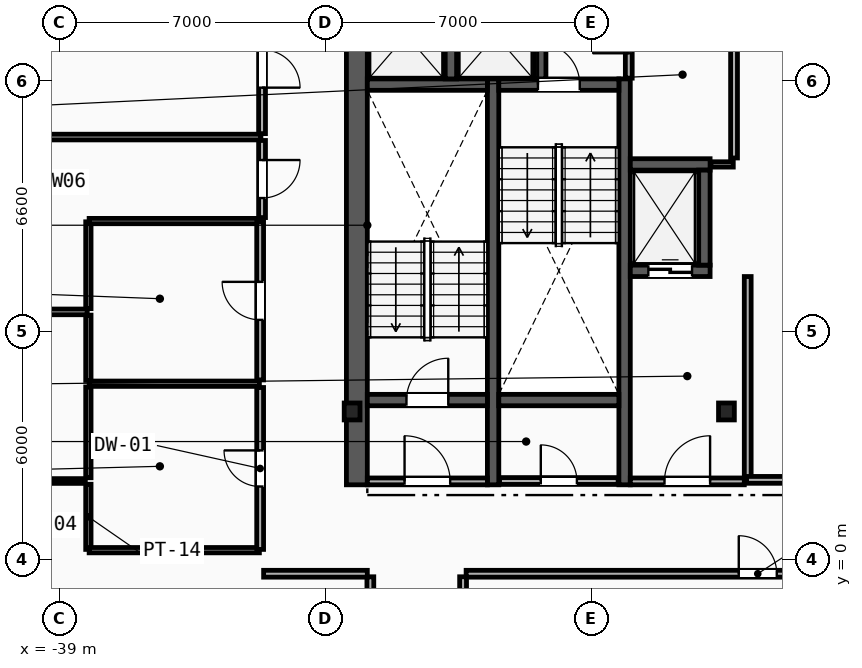
"""IFC4 building model, lengths in metres.
Left out: names, types, materials, properties, quantities, classifications, styles, units other than length and angle.
Written with IfcOpenShell. Run it as: python <this file> out.ifc"""

import sys

from ifc_helpers import new_model, si_unit, direction, frame, frame_2d, origin, origin_2d, place, context, subcontext, project, spatial, rectangle, i_section, extrude, element, fill, save


model = new_model("IFC4")
c1 = context("Model", 3, precision=1e-05, world=origin(), true_north=direction((0.0, 1.0)))
c2 = subcontext(c1, "Body", "Model", "MODEL_VIEW")
j1 = project(units=[si_unit("LENGTHUNIT", "METRE"), si_unit("PLANEANGLEUNIT", "RADIAN")], contexts=[c1])
p1 = place(None, origin())
s1 = spatial("IfcSite", under=j1, at=p1, CompositionType="ELEMENT")
p2 = place(p1, origin())
s2 = spatial("IfcBuilding", under=s1, at=p2, CompositionType="ELEMENT")
p3 = place(p2, frame((0.0, 0.0, 254.0)))
s3 = spatial("IfcBuildingStorey", under=s2, at=p3, CompositionType="ELEMENT", Elevation=254.0)
for number, where, z_axis, x_axis in (
    (1, (-31.3, 3.9, 0.0), (0.0, 0.0, 1.0), (1.0, 0.0, 0.0)),
    (2, (-21.45, 3.9, 0.0), (0.0, 0.0, 1.0), (1.0, 0.0, 0.0)),
):
    element("IfcColumn", number, at=place(p3, frame(where, z_axis=z_axis, x_axis=x_axis)), inside=s3, PredefinedType="COLUMN", context=c2, shape_type="SweptSolid", body=[
        extrude(i_section(OverallWidth=0.416, OverallDepth=0.446, WebThickness=0.039, FlangeThickness=0.063, FilletRadius=0.018, at=origin_2d()), origin(), (0.0, 0.0, 1.0), 3.6),
    ])
p4 = place(p3, frame((-31.175, 1.97, 0.0), z_axis=(0.0, 0.0, 1.0), x_axis=(0.0, 1.0, 0.0)))
e3 = element("IfcWall", 3, at=p4, inside=s3, PredefinedType="SHEAR", context=c2, shape_type="SweptSolid", body=[
    extrude(rectangle(XDim=13.33, YDim=0.55, at=frame_2d((6.665, 0.0))), origin(), (0.0, 0.0, 1.0), 3.34),
])
for number, where, z_axis, x_axis in (
    (4, (-27.59, 1.97, 0.0), (0.0, 0.0, 1.0), (0.0, 1.0, 0.0)),
    (5, (-24.13, 1.97, 0.0), (0.0, 0.0, 1.0), (0.0, 1.0, 0.0)),
):
    element("IfcWall", number, at=place(p3, frame(where, z_axis=z_axis, x_axis=x_axis)), inside=s3, PredefinedType="SHEAR", context=c2, shape_type="SweptSolid", body=[
        extrude(rectangle(XDim=10.68, YDim=0.3, at=frame_2d((5.34, 0.0))), origin(), (0.0, 0.0, 1.0), 3.34),
    ])
p5 = place(p3, frame((-30.9, 4.2, 0.0), z_axis=(0.0, 0.0, 1.0), x_axis=(1.0, 0.0, 0.0)))
e6 = element("IfcWall", 6, at=p5, inside=s3, PredefinedType="SHEAR", context=c2, shape_type="SweptSolid", body=[
    extrude(rectangle(XDim=3.16, YDim=0.3, at=frame_2d((1.58, 0.0))), origin(), (0.0, 0.0, 1.0), 3.34),
])
p6 = place(p5, frame((1.03, 0.0, 0.0)))
e7 = element("IfcOpeningElement", 7, at=p6, cuts=e6, PredefinedType="OPENING", context=c2, shape_type="SweptSolid", body=[
    extrude(rectangle(XDim=1.1, YDim=2.15, at=frame_2d((0.55, 1.075))), frame((0.0, 0.16, 0.0), z_axis=(0.0, -1.0, 0.0), x_axis=(1.0, 0.0, 0.0)), (0.0, 0.0, 1.0), 0.32),
])
p7 = place(p3, frame((-30.9, 12.5, 0.0), z_axis=(0.0, 0.0, 1.0), x_axis=(1.0, 0.0, 0.0)))
e8 = element("IfcWall", 8, at=p7, inside=s3, PredefinedType="SHEAR", context=c2, shape_type="SweptSolid", body=[
    extrude(rectangle(XDim=3.16, YDim=0.3, at=frame_2d((1.58, 0.0))), origin(), (0.0, 0.0, 1.0), 3.34),
])
p8 = place(p3, frame((-27.44, 12.5, 0.0), z_axis=(0.0, 0.0, 1.0), x_axis=(1.0, 0.0, 0.0)))
e9 = element("IfcWall", 9, at=p8, inside=s3, PredefinedType="SHEAR", context=c2, shape_type="SweptSolid", body=[
    extrude(rectangle(XDim=3.16, YDim=0.3, at=frame_2d((1.58, 0.0))), origin(), (0.0, 0.0, 1.0), 3.34),
])
p9 = place(p8, frame((1.03, 0.0, 0.0)))
e10 = element("IfcOpeningElement", 10, at=p9, cuts=e9, PredefinedType="OPENING", context=c2, shape_type="SweptSolid", body=[
    extrude(rectangle(XDim=1.1, YDim=2.15, at=frame_2d((0.55, 1.075))), frame((0.0, 0.16, 0.0), z_axis=(0.0, -1.0, 0.0), x_axis=(1.0, 0.0, 0.0)), (0.0, 0.0, 1.0), 0.32),
])
p10 = place(p3, frame((-27.44, 4.2, 0.0), z_axis=(0.0, 0.0, 1.0), x_axis=(1.0, 0.0, 0.0)))
e11 = element("IfcWall", 11, at=p10, inside=s3, PredefinedType="SHEAR", context=c2, shape_type="SweptSolid", body=[
    extrude(rectangle(XDim=3.16, YDim=0.3, at=frame_2d((1.58, 0.0))), origin(), (0.0, 0.0, 1.0), 3.34),
])
p11 = place(p3, frame((-20.89, 2.15, 0.0), z_axis=(0.0, 0.0, 1.0), x_axis=(0.0, 1.0, 0.0)))
e12 = element("IfcWall", 12, at=p11, inside=s3, PredefinedType="PARTITIONING", context=c2, shape_type="SweptSolid", body=[
    extrude(rectangle(XDim=5.3, YDim=0.18, at=frame_2d((2.65, 0.0))), origin(), (0.0, 0.0, 1.0), 3.34),
])
p12 = place(p3, frame((-23.98, 2.06, 0.0), z_axis=(0.0, 0.0, 1.0), x_axis=(1.0, 0.0, 0.0)))
e13 = element("IfcWall", 13, at=p12, inside=s3, PredefinedType="PARTITIONING", context=c2, shape_type="SweptSolid", body=[
    extrude(rectangle(XDim=3.0, YDim=0.18, at=frame_2d((1.5, 0.0))), origin(), (0.0, 0.0, 1.0), 3.34),
])
p13 = place(p12, frame((0.9, 0.0, 0.0)))
e14 = element("IfcOpeningElement", 14, at=p13, cuts=e13, PredefinedType="OPENING", context=c2, shape_type="SweptSolid", body=[
    extrude(rectangle(XDim=1.2, YDim=2.15, at=frame_2d((0.6, 1.075))), frame((0.0, 0.1, 0.0), z_axis=(0.0, -1.0, 0.0), x_axis=(1.0, 0.0, 0.0)), (0.0, 0.0, 1.0), 0.2),
])
p14 = place(p3, frame((-30.9, 2.06, 0.0), z_axis=(0.0, 0.0, 1.0), x_axis=(1.0, 0.0, 0.0)))
e15 = element("IfcWall", 15, at=p14, inside=s3, PredefinedType="PARTITIONING", context=c2, shape_type="SweptSolid", body=[
    extrude(rectangle(XDim=3.16, YDim=0.18, at=frame_2d((1.58, 0.0))), origin(), (0.0, 0.0, 1.0), 3.34),
])
p15 = place(p14, frame((0.98, 0.0, 0.0)))
e16 = element("IfcOpeningElement", 16, at=p15, cuts=e15, PredefinedType="OPENING", context=c2, shape_type="SweptSolid", body=[
    extrude(rectangle(XDim=1.2, YDim=2.15, at=frame_2d((0.6, 1.075))), frame((0.0, 0.1, 0.0), z_axis=(0.0, -1.0, 0.0), x_axis=(1.0, 0.0, 0.0)), (0.0, 0.0, 1.0), 0.2),
])
p16 = place(p3, frame((-23.98, 7.6, 0.0), z_axis=(0.0, 0.0, 1.0), x_axis=(1.0, 0.0, 0.0)))
e17 = element("IfcWall", 17, at=p16, inside=s3, PredefinedType="SHEAR", context=c2, shape_type="SweptSolid", body=[
    extrude(rectangle(XDim=2.1, YDim=0.3, at=frame_2d((1.05, 0.0))), origin(), (0.0, 0.0, 1.0), 3.34),
])
p17 = place(p16, frame((0.475, 0.0, 0.0)))
e18 = element("IfcOpeningElement", 18, at=p17, cuts=e17, PredefinedType="OPENING", context=c2, shape_type="SweptSolid", body=[
    extrude(rectangle(XDim=1.15, YDim=2.2, at=frame_2d((0.575, 1.1))), frame((0.0, 0.16, 0.0), z_axis=(0.0, -1.0, 0.0), x_axis=(1.0, 0.0, 0.0)), (0.0, 0.0, 1.0), 0.32),
])
p18 = place(p3, frame((-23.98, 10.4, 0.0), z_axis=(0.0, 0.0, 1.0), x_axis=(1.0, 0.0, 0.0)))
e19 = element("IfcWall", 19, at=p18, inside=s3, PredefinedType="SHEAR", context=c2, shape_type="SweptSolid", body=[
    extrude(rectangle(XDim=2.1, YDim=0.3, at=frame_2d((1.05, 0.0))), origin(), (0.0, 0.0, 1.0), 3.34),
])
p19 = place(p3, frame((-22.03, 7.75, 0.0), z_axis=(0.0, 0.0, 1.0), x_axis=(0.0, 1.0, 0.0)))
e20 = element("IfcWall", 20, at=p19, inside=s3, PredefinedType="SHEAR", context=c2, shape_type="SweptSolid", body=[
    extrude(rectangle(XDim=2.5, YDim=0.3, at=frame_2d((1.25, 0.0))), origin(), (0.0, 0.0, 1.0), 3.34),
])
for number, where, z_axis, x_axis in (
    (21, (-28.7, 12.65, 0.0), (0.0, 0.0, 1.0), (0.0, 1.0, 0.0)),
    (22, (-26.35, 12.65, 0.0), (0.0, 0.0, 1.0), (0.0, 1.0, 0.0)),
):
    element("IfcWall", number, at=place(p3, frame(where, z_axis=z_axis, x_axis=x_axis)), inside=s3, PredefinedType="SHEAR", context=c2, shape_type="SweptSolid", body=[
        extrude(rectangle(XDim=2.3, YDim=0.3, at=frame_2d((1.15, 0.0))), origin(), (0.0, 0.0, 1.0), 3.34),
    ])
p20 = place(p3, frame((-21.86, 10.4, 0.0), z_axis=(0.0, 0.0, 1.0), x_axis=(1.0, 0.0, 0.0)))
e23 = element("IfcWall", 23, at=p20, inside=s3, PredefinedType="PARTITIONING", context=c2, shape_type="SweptSolid", body=[
    extrude(rectangle(XDim=0.59, YDim=0.14, at=frame_2d((0.295, 0.0))), origin(), (0.0, 0.0, 1.0), 3.34),
])
p21 = place(p3, frame((-21.25, 10.57, 0.0), z_axis=(0.0, 0.0, 1.0), x_axis=(0.0, 1.0, 0.0)))
e24 = element("IfcWall", 24, at=p21, inside=s3, PredefinedType="PARTITIONING", context=c2, shape_type="SweptSolid", body=[
    extrude(rectangle(XDim=4.36, YDim=0.18, at=frame_2d((2.18, 0.0))), origin(), (0.0, 0.0, 1.0), 3.34),
])
p22 = place(p3, frame((-27.42, 2.07, 0.0), z_axis=(0.0, 0.0, 1.0), x_axis=(1.0, 0.0, 0.0)))
e25 = element("IfcWall", 25, at=p22, inside=s3, PredefinedType="PARTITIONING", context=c2, shape_type="SweptSolid", body=[
    extrude(rectangle(XDim=3.12, YDim=0.18, at=frame_2d((1.56, 0.0))), origin(), (0.0, 0.0, 1.0), 3.34),
])
p23 = place(p22, frame((1.085, 0.0, 0.0)))
e26 = element("IfcOpeningElement", 26, at=p23, cuts=e25, PredefinedType="OPENING", context=c2, shape_type="SweptSolid", body=[
    extrude(rectangle(XDim=0.95, YDim=2.1, at=frame_2d((0.475, 1.05))), frame((0.0, 0.1, 0.0), z_axis=(0.0, -1.0, 0.0), x_axis=(1.0, 0.0, 0.0)), (0.0, 0.0, 1.0), 0.2),
])
p24 = place(p3, frame((-24.02, 12.67, 0.0), z_axis=(0.0, 0.0, 1.0), x_axis=(0.0, 1.0, 0.0)))
e27 = element("IfcWall", 27, at=p24, inside=s3, PredefinedType="PARTITIONING", context=c2, shape_type="SweptSolid", body=[
    extrude(rectangle(XDim=2.26, YDim=0.18, at=frame_2d((1.13, 0.0))), origin(), (0.0, 0.0, 1.0), 3.34),
])
p25 = place(p24, frame((0.655, 0.0, 0.0)))
e28 = element("IfcOpeningElement", 28, at=p25, cuts=e27, PredefinedType="OPENING", context=c2, shape_type="SweptSolid", body=[
    extrude(rectangle(XDim=0.95, YDim=2.1, at=frame_2d((0.475, 1.05))), frame((0.0, 0.1, 0.0), z_axis=(0.0, -1.0, 0.0), x_axis=(1.0, 0.0, 0.0)), (0.0, 0.0, 1.0), 0.2),
])
p26 = place(p3, frame((-38.24, 0.27, 0.0), z_axis=(0.0, 0.0, 1.0), x_axis=(0.0, 1.0, 0.0)))
e29 = element("IfcWall", 29, at=p26, inside=s3, PredefinedType="PARTITIONING", context=c2, shape_type="SweptSolid", body=[
    extrude(rectangle(XDim=1.715, YDim=0.14, at=frame_2d((0.857, 0.0))), origin(), (0.0, 0.0, 1.0), 3.34),
])
p27 = place(p3, frame((-38.24, 2.155, 0.0), z_axis=(0.0, 0.0, 1.0), x_axis=(0.0, 1.0, 0.0)))
e30 = element("IfcWall", 30, at=p27, inside=s3, PredefinedType="PARTITIONING", context=c2, shape_type="SweptSolid", body=[
    extrude(rectangle(XDim=2.39, YDim=0.14, at=frame_2d((1.195, 0.0))), origin(), (0.0, 0.0, 1.0), 3.34),
])
p28 = place(p3, frame((-38.24, 4.715, 0.0), z_axis=(0.0, 0.0, 1.0), x_axis=(0.0, 1.0, 0.0)))
e31 = element("IfcWall", 31, at=p28, inside=s3, PredefinedType="PARTITIONING", context=c2, shape_type="SweptSolid", body=[
    extrude(rectangle(XDim=1.72, YDim=0.14, at=frame_2d((0.86, 0.0))), origin(), (0.0, 0.0, 1.0), 3.34),
])
p29 = place(p3, frame((-38.24, 6.605, 0.0), z_axis=(0.0, 0.0, 1.0), x_axis=(0.0, 1.0, 0.0)))
e32 = element("IfcWall", 32, at=p29, inside=s3, PredefinedType="PARTITIONING", context=c2, shape_type="SweptSolid", body=[
    extrude(rectangle(XDim=2.285, YDim=0.14, at=frame_2d((1.143, 0.0))), origin(), (0.0, 0.0, 1.0), 3.34),
])
for number, where, z_axis, x_axis in (
    (33, (-38.22, 0.25, 0.0), (0.0, 0.0, 1.0), (1.0, 0.0, 0.0)),
    (34, (-38.22, 4.63, 0.0), (0.0, 0.0, 1.0), (1.0, 0.0, 0.0)),
    (35, (-38.22, 8.91, 0.0), (0.0, 0.0, 1.0), (1.0, 0.0, 0.0)),
):
    element("IfcWall", number, at=place(p3, frame(where, z_axis=z_axis, x_axis=x_axis)), inside=s3, PredefinedType="PARTITIONING", context=c2, shape_type="SweptSolid", body=[
        extrude(rectangle(XDim=4.48, YDim=0.14, at=frame_2d((2.24, 0.0))), origin(), (0.0, 0.0, 1.0), 3.34),
    ])
p30 = place(p3, frame((-33.72, 0.27, 0.0), z_axis=(0.0, 0.0, 1.0), x_axis=(0.0, 1.0, 0.0)))
e36 = element("IfcWall", 36, at=p30, inside=s3, PredefinedType="PARTITIONING", context=c2, shape_type="SweptSolid", body=[
    extrude(rectangle(XDim=4.26, YDim=0.18, at=frame_2d((2.13, 0.0))), origin(), (0.0, 0.0, 1.0), 3.34),
])
p31 = place(p30, frame((1.655, 0.0, 0.0)))
e37 = element("IfcOpeningElement", 37, at=p31, cuts=e36, PredefinedType="OPENING", context=c2, shape_type="SweptSolid", body=[
    extrude(rectangle(XDim=0.95, YDim=2.1, at=frame_2d((0.475, 1.05))), frame((0.0, 0.1, 0.0), z_axis=(0.0, -1.0, 0.0), x_axis=(1.0, 0.0, 0.0)), (0.0, 0.0, 1.0), 0.2),
])
p32 = place(p3, frame((-33.72, 4.73, 0.0), z_axis=(0.0, 0.0, 1.0), x_axis=(0.0, 1.0, 0.0)))
e38 = element("IfcWall", 38, at=p32, inside=s3, PredefinedType="PARTITIONING", context=c2, shape_type="SweptSolid", body=[
    extrude(rectangle(XDim=4.16, YDim=0.18, at=frame_2d((2.08, 0.0))), origin(), (0.0, 0.0, 1.0), 3.34),
])
p33 = place(p32, frame((1.58, 0.0, 0.0)))
e39 = element("IfcOpeningElement", 39, at=p33, cuts=e38, PredefinedType="OPENING", context=c2, shape_type="SweptSolid", body=[
    extrude(rectangle(XDim=1.0, YDim=2.15, at=frame_2d((0.5, 1.075))), frame((0.0, 0.1, 0.0), z_axis=(0.0, -1.0, 0.0), x_axis=(1.0, 0.0, 0.0)), (0.0, 0.0, 1.0), 0.2),
])
p34 = place(p3, frame((-50.79, 6.52, 0.0), z_axis=(0.0, 0.0, 1.0), x_axis=(1.0, 0.0, 0.0)))
e40 = element("IfcWall", 40, at=p34, inside=s3, PredefinedType="PARTITIONING", context=c2, shape_type="SweptSolid", body=[
    extrude(rectangle(XDim=12.52, YDim=0.15, at=frame_2d((6.26, 0.0))), origin(), (0.0, 0.0, 1.0), 3.34),
])
p35 = place(p3, frame((-50.007, 11.12, 0.0), z_axis=(0.0, 0.0, 1.0), x_axis=(1.0, 0.0, 0.0)))
e41 = element("IfcWall", 41, at=p35, inside=s3, PredefinedType="PARTITIONING", context=c2, shape_type="SweptSolid", body=[
    extrude(rectangle(XDim=16.307, YDim=0.15, at=frame_2d((8.153, 0.0))), origin(), (0.0, 0.0, 1.0), 3.34),
])
p36 = place(p3, frame((-28.3, -0.37, 0.0), z_axis=(0.0, 0.0, 1.0), x_axis=(1.0, 0.0, 0.0)))
e42 = element("IfcWall", 42, at=p36, inside=s3, PredefinedType="PARTITIONING", context=c2, shape_type="SweptSolid", body=[
    extrude(rectangle(XDim=15.349, YDim=0.18, at=frame_2d((7.675, 0.0))), origin(), (0.0, 0.0, 1.0), 3.34),
])
p37 = place(p36, frame((7.175, 0.0, 0.0)))
e43 = element("IfcOpeningElement", 43, at=p37, cuts=e42, PredefinedType="OPENING", context=c2, shape_type="SweptSolid", body=[
    extrude(rectangle(XDim=1.0, YDim=2.15, at=frame_2d((0.5, 1.075))), frame((0.0, 0.1, 0.0), z_axis=(0.0, -1.0, 0.0), x_axis=(1.0, 0.0, 0.0)), (0.0, 0.0, 1.0), 0.2),
])
p38 = place(p3, frame((-28.38, -9.99, 0.0), z_axis=(0.0, 0.0, 1.0), x_axis=(0.0, 1.0, 0.0)))
e44 = element("IfcWall", 44, at=p38, inside=s3, PredefinedType="PARTITIONING", context=c2, shape_type="SweptSolid", body=[
    extrude(rectangle(XDim=9.54, YDim=0.18, at=frame_2d((4.77, 0.0))), origin(), (0.0, 0.0, 1.0), 3.34),
])
p39 = place(p3, frame((-30.82, -0.45, 0.0), z_axis=(0.0, 0.0, 1.0), x_axis=(0.0, -1.0, 0.0)))
e45 = element("IfcWall", 45, at=p39, inside=s3, PredefinedType="PARTITIONING", context=c2, shape_type="SweptSolid", body=[
    extrude(rectangle(XDim=9.54, YDim=0.18, at=frame_2d((4.77, 0.0))), origin(), (0.0, 0.0, 1.0), 3.34),
])
p40 = place(p39, frame((4.27, 0.0, 0.0)))
e46 = element("IfcOpeningElement", 46, at=p40, cuts=e45, PredefinedType="OPENING", context=c2, shape_type="SweptSolid", body=[
    extrude(rectangle(XDim=1.0, YDim=2.15, at=frame_2d((0.5, 1.075))), frame((0.0, 0.1, 0.0), z_axis=(0.0, -1.0, 0.0), x_axis=(1.0, 0.0, 0.0)), (0.0, 0.0, 1.0), 0.2),
])
p41 = place(p3, frame((-33.628, -0.37, 0.0), z_axis=(0.0, 0.0, 1.0), x_axis=(1.0, 0.0, 0.0)))
e47 = element("IfcWall", 47, at=p41, inside=s3, PredefinedType="PARTITIONING", context=c2, shape_type="SweptSolid", body=[
    extrude(rectangle(XDim=2.729, YDim=0.18, at=frame_2d((1.364, 0.0))), origin(), (0.0, 0.0, 1.0), 3.34),
])
p42 = place(p3, frame((-33.67, 11.03, 0.0), z_axis=(0.0, 0.0, 1.0), x_axis=(0.0, -1.0, 0.0)))
e48 = element("IfcWall", 48, at=p42, inside=s3, PredefinedType="PARTITIONING", context=c2, shape_type="SweptSolid", body=[
    extrude(rectangle(XDim=2.029, YDim=0.18, at=frame_2d((1.014, 0.0))), origin(), (0.0, 0.0, 1.0), 3.34),
])
p43 = place(p42, frame((0.514, 0.0, 0.0)))
e49 = element("IfcOpeningElement", 49, at=p43, cuts=e48, PredefinedType="OPENING", context=c2, shape_type="SweptSolid", body=[
    extrude(rectangle(XDim=1.0, YDim=2.15, at=frame_2d((0.5, 1.075))), frame((0.0, 0.1, 0.0), z_axis=(0.0, -1.0, 0.0), x_axis=(1.0, 0.0, 0.0)), (0.0, 0.0, 1.0), 0.2),
])
p44 = place(p3, frame((-33.67, 14.63, 0.0), z_axis=(0.0, 0.0, 1.0), x_axis=(0.0, -1.0, 0.0)))
e50 = element("IfcWall", 50, at=p44, inside=s3, PredefinedType="PARTITIONING", context=c2, shape_type="SweptSolid", body=[
    extrude(rectangle(XDim=3.42, YDim=0.18, at=frame_2d((1.71, 0.0))), origin(), (0.0, 0.0, 1.0), 3.34),
])
p45 = place(p44, frame((1.21, 0.0, 0.0)))
e51 = element("IfcOpeningElement", 51, at=p45, cuts=e50, PredefinedType="OPENING", context=c2, shape_type="SweptSolid", body=[
    extrude(rectangle(XDim=1.0, YDim=2.15, at=frame_2d((0.5, 1.075))), frame((0.0, 0.1, 0.0), z_axis=(0.0, -1.0, 0.0), x_axis=(1.0, 0.0, 0.0)), (0.0, 0.0, 1.0), 0.2),
])
p46 = place(p3, frame((-16.9, 2.1, 0.0), z_axis=(0.0, 0.0, 1.0), x_axis=(-1.0, 0.0, 0.0)))
e52 = element("IfcWall", 52, at=p46, inside=s3, PredefinedType="PARTITIONING", context=c2, shape_type="SweptSolid", body=[
    extrude(rectangle(XDim=4.02, YDim=0.18, at=frame_2d((2.01, 0.0))), origin(), (0.0, 0.0, 1.0), 3.34),
])
p47 = place(p3, frame((-38.32, 2.07, 0.0), z_axis=(0.0, 0.0, 1.0), x_axis=(-1.0, 0.0, 0.0)))
e53 = element("IfcWall", 53, at=p47, inside=s3, PredefinedType="PARTITIONING", context=c2, shape_type="SweptSolid", body=[
    extrude(rectangle(XDim=12.729, YDim=0.125, at=frame_2d((6.365, 0.0))), origin(), (0.0, 0.0, 1.0), 3.34),
])
p48 = place(p47, frame((5.865, 0.0, 0.0)))
e54 = element("IfcOpeningElement", 54, at=p48, cuts=e53, PredefinedType="OPENING", context=c2, shape_type="SweptSolid", body=[
    extrude(rectangle(XDim=1.0, YDim=2.15, at=frame_2d((0.5, 1.075))), frame((0.0, 0.073, 0.0), z_axis=(0.0, -1.0, 0.0), x_axis=(1.0, 0.0, 0.0)), (0.0, 0.0, 1.0), 0.145),
])
p49 = place(p6, origin())
e55 = element("IfcDoor", 55, at=p49, inside=s3, OperationType="SINGLE_SWING_RIGHT", PredefinedType="DOOR", context=c2, shape_type="SweptSolid", body=[
    extrude(rectangle(XDim=1.1, YDim=2.15, at=frame_2d((0.55, 1.075))), frame((0.0, 0.025, 0.0), z_axis=(0.0, -1.0, 0.0), x_axis=(1.0, 0.0, 0.0)), (0.0, 0.0, 1.0), 0.05),
])
fill(e7, e55)
p50 = place(p9, origin())
e56 = element("IfcDoor", 56, at=p50, inside=s3, OperationType="SINGLE_SWING_LEFT", PredefinedType="DOOR", context=c2, shape_type="SweptSolid", body=[
    extrude(rectangle(XDim=1.1, YDim=2.15, at=frame_2d((0.55, 1.075))), frame((0.0, 0.025, 0.0), z_axis=(0.0, -1.0, 0.0), x_axis=(1.0, 0.0, 0.0)), (0.0, 0.0, 1.0), 0.05),
])
fill(e10, e56)
p51 = place(p13, origin())
e57 = element("IfcDoor", 57, at=p51, inside=s3, OperationType="SINGLE_SWING_RIGHT", PredefinedType="DOOR", context=c2, shape_type="SweptSolid", body=[
    extrude(rectangle(XDim=1.2, YDim=2.15, at=frame_2d((0.6, 1.075))), frame((0.0, 0.025, 0.0), z_axis=(0.0, -1.0, 0.0), x_axis=(1.0, 0.0, 0.0)), (0.0, 0.0, 1.0), 0.05),
])
fill(e14, e57)
p52 = place(p15, origin())
e58 = element("IfcDoor", 58, at=p52, inside=s3, OperationType="SINGLE_SWING_LEFT", PredefinedType="DOOR", context=c2, shape_type="SweptSolid", body=[
    extrude(rectangle(XDim=1.2, YDim=2.15, at=frame_2d((0.6, 1.075))), frame((0.0, 0.025, 0.0), z_axis=(0.0, -1.0, 0.0), x_axis=(1.0, 0.0, 0.0)), (0.0, 0.0, 1.0), 0.05),
])
fill(e16, e58)
p53 = place(p17, origin())
e59 = element("IfcDoor", 59, at=p53, inside=s3, OperationType="SLIDING_TO_LEFT", PredefinedType="TRAPDOOR", context=c2, shape_type="SweptSolid", body=[
    extrude(rectangle(XDim=1.15, YDim=2.2, at=frame_2d((0.575, 1.1))), frame((0.0, 0.025, 0.0), z_axis=(0.0, -1.0, 0.0), x_axis=(1.0, 0.0, 0.0)), (0.0, 0.0, 1.0), 0.05),
])
fill(e18, e59)
p54 = place(p37, origin())
e60 = element("IfcDoor", 60, at=p54, inside=s3, OperationType="SINGLE_SWING_LEFT", PredefinedType="DOOR", context=c2, shape_type="SweptSolid", body=[
    extrude(rectangle(XDim=1.0, YDim=2.15, at=frame_2d((0.5, 1.075))), frame((0.0, 0.025, 0.0), z_axis=(0.0, -1.0, 0.0), x_axis=(1.0, 0.0, 0.0)), (0.0, 0.0, 1.0), 0.05),
])
fill(e43, e60)
p55 = place(p31, origin())
e61 = element("IfcDoor", 61, at=p55, inside=s3, OperationType="SINGLE_SWING_RIGHT", PredefinedType="DOOR", context=c2, shape_type="SweptSolid", body=[
    extrude(rectangle(XDim=0.95, YDim=2.1, at=frame_2d((0.475, 1.05))), frame((0.0, 0.025, 0.0), z_axis=(0.0, -1.0, 0.0), x_axis=(1.0, 0.0, 0.0)), (0.0, 0.0, 1.0), 0.05),
])
fill(e37, e61)
p56 = place(p33, origin())
e62 = element("IfcDoor", 62, at=p56, inside=s3, OperationType="SINGLE_SWING_RIGHT", PredefinedType="DOOR", context=c2, shape_type="SweptSolid", body=[
    extrude(rectangle(XDim=1.0, YDim=2.15, at=frame_2d((0.5, 1.075))), frame((0.0, 0.025, 0.0), z_axis=(0.0, -1.0, 0.0), x_axis=(1.0, 0.0, 0.0)), (0.0, 0.0, 1.0), 0.05),
])
fill(e39, e62)
p57 = place(p45, origin())
e63 = element("IfcDoor", 63, at=p57, inside=s3, OperationType="SINGLE_SWING_RIGHT", PredefinedType="DOOR", context=c2, shape_type="SweptSolid", body=[
    extrude(rectangle(XDim=1.0, YDim=2.15, at=frame_2d((0.5, 1.075))), frame((0.0, 0.025, 0.0), z_axis=(0.0, -1.0, 0.0), x_axis=(1.0, 0.0, 0.0)), (0.0, 0.0, 1.0), 0.05),
])
fill(e51, e63)
p58 = place(p23, origin())
e64 = element("IfcDoor", 64, at=p58, inside=s3, OperationType="SINGLE_SWING_LEFT", PredefinedType="DOOR", context=c2, shape_type="SweptSolid", body=[
    extrude(rectangle(XDim=0.95, YDim=2.1, at=frame_2d((0.475, 1.05))), frame((0.0, 0.025, 0.0), z_axis=(0.0, -1.0, 0.0), x_axis=(1.0, 0.0, 0.0)), (0.0, 0.0, 1.0), 0.05),
])
fill(e26, e64)
p59 = place(p25, origin())
e65 = element("IfcDoor", 65, at=p59, inside=s3, OperationType="SINGLE_SWING_LEFT", PredefinedType="DOOR", context=c2, shape_type="SweptSolid", body=[
    extrude(rectangle(XDim=0.95, YDim=2.1, at=frame_2d((0.475, 1.05))), frame((0.0, 0.025, 0.0), z_axis=(0.0, -1.0, 0.0), x_axis=(1.0, 0.0, 0.0)), (0.0, 0.0, 1.0), 0.05),
])
fill(e28, e65)
p60 = place(p43, origin())
e66 = element("IfcDoor", 66, at=p60, inside=s3, OperationType="SINGLE_SWING_LEFT", PredefinedType="DOOR", context=c2, shape_type="SweptSolid", body=[
    extrude(rectangle(XDim=1.0, YDim=2.15, at=frame_2d((0.5, 1.075))), frame((0.0, 0.025, 0.0), z_axis=(0.0, -1.0, 0.0), x_axis=(1.0, 0.0, 0.0)), (0.0, 0.0, 1.0), 0.05),
])
fill(e49, e66)
save(model, sys.argv[1])
